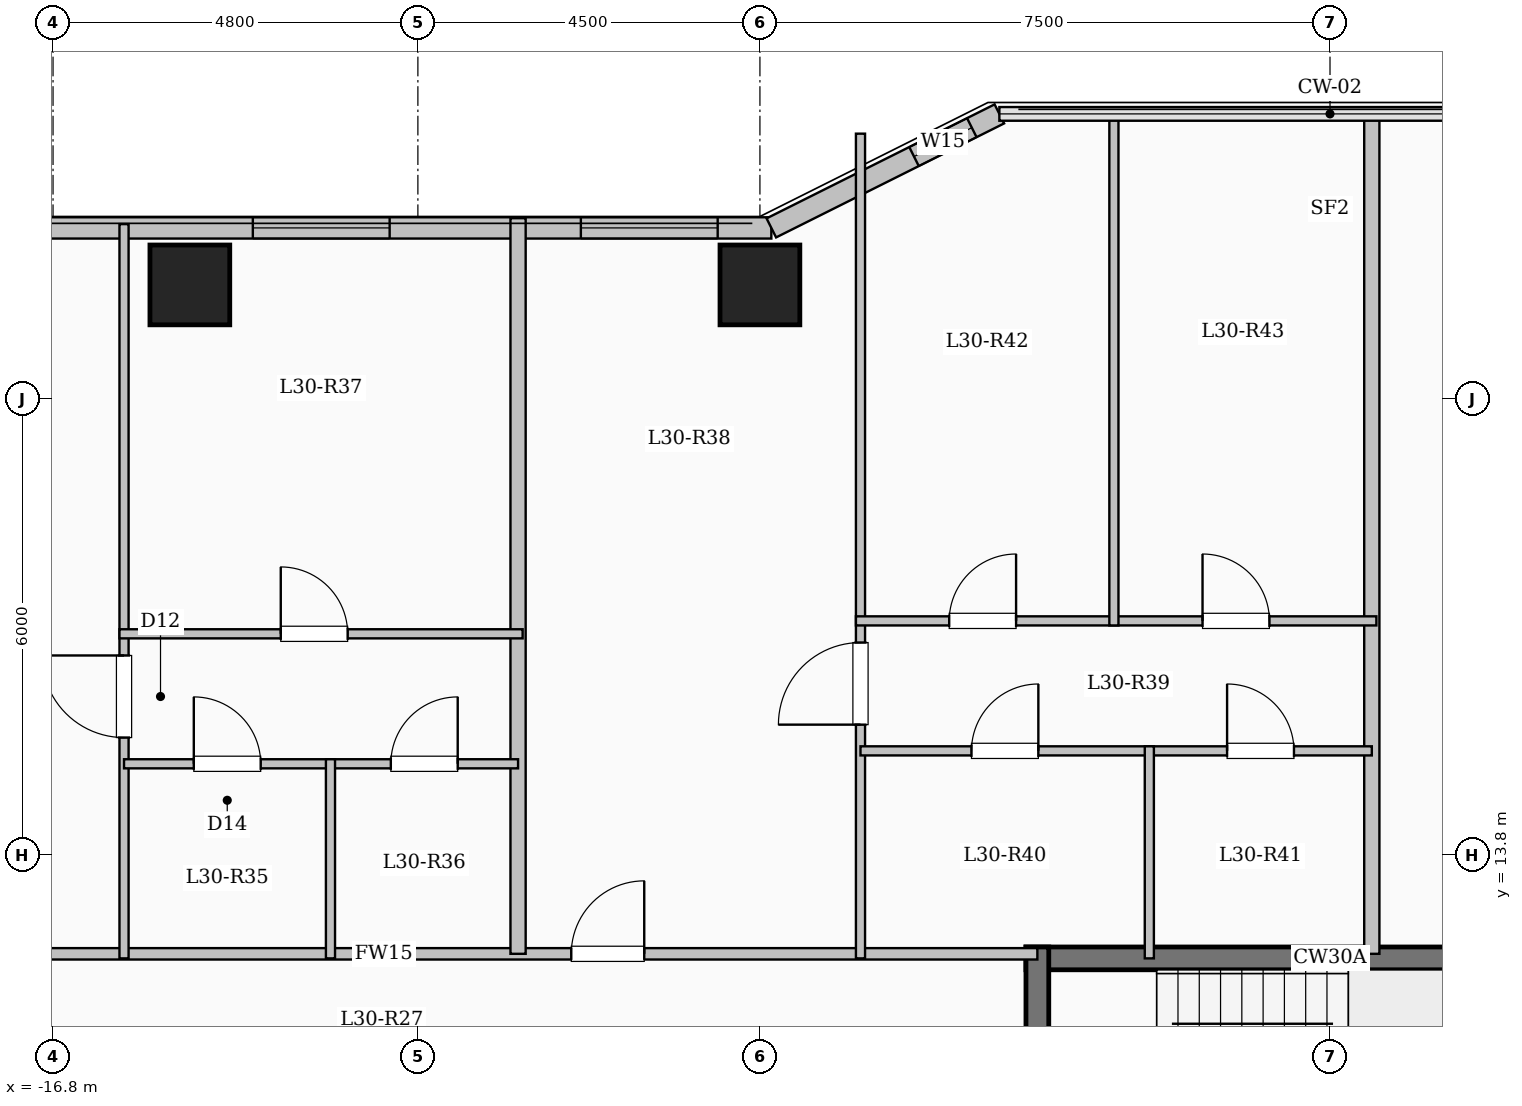
"""IFC4 building model, lengths in metres.
Left out: names, types, materials, properties, quantities, classifications, styles, units other than length and angle.
Written with IfcOpenShell. Run it as: python <this file> out.ifc"""

import sys

from ifc_helpers import new_model, si_unit, direction, frame, frame_2d, origin, origin_2d, place, context, subcontext, project, spatial, rectangle, extrude, element, fill, save


model = new_model("IFC4")
c1 = context("Model", 3, precision=1e-05, world=origin(), true_north=direction((0.0, 1.0)))
c2 = subcontext(c1, "Body", "Model", "MODEL_VIEW")
j1 = project(units=[si_unit("LENGTHUNIT", "METRE"), si_unit("PLANEANGLEUNIT", "RADIAN")], contexts=[c1])
p1 = place(None, origin())
s1 = spatial("IfcSite", under=j1, at=p1, CompositionType="ELEMENT")
p2 = place(p1, origin())
s2 = spatial("IfcBuilding", under=s1, at=p2, CompositionType="ELEMENT")
p3 = place(p2, frame((0.0, 0.0, 111.8)))
s3 = spatial("IfcBuildingStorey", under=s2, at=p3, CompositionType="ELEMENT", Elevation=111.8)
for number, where, z_axis, x_axis in (
    (1, (-15.0, 21.3, 0.0), (0.0, 0.0, 1.0), (1.0, 0.0, 0.0)),
    (2, (-7.5, 21.3, 0.0), (0.0, 0.0, 1.0), (1.0, 0.0, 0.0)),
):
    element("IfcColumn", number, at=place(p3, frame(where, z_axis=z_axis, x_axis=x_axis)), inside=s3, PredefinedType="COLUMN", context=c2, shape_type="SweptSolid", body=[
        extrude(rectangle(XDim=1.05, YDim=1.05, at=origin_2d()), origin(), (0.0, 0.0, 1.0), 3.35),
    ])
p4 = place(p3, frame((-21.15, 22.05, 0.0), z_axis=(0.0, 0.0, 1.0), x_axis=(1.0, 0.0, 0.0)))
e3 = element("IfcWall", 3, at=p4, inside=s3, PredefinedType="SOLIDWALL", context=c2, shape_type="SweptSolid", body=[
    extrude(rectangle(XDim=13.8, YDim=0.28, at=frame_2d((6.9, 0.0))), origin(), (0.0, 0.0, 1.0), 3.1),
])
p5 = place(p4, frame((1.485, 0.0, 0.9)))
e4 = element("IfcOpeningElement", 4, at=p5, cuts=e3, PredefinedType="OPENING", context=c2, shape_type="SweptSolid", body=[
    extrude(rectangle(XDim=2.4, YDim=1.8, at=frame_2d((1.2, 0.9))), frame((0.0, 0.15, 0.0), z_axis=(0.0, -1.0, 0.0), x_axis=(1.0, 0.0, 0.0)), (0.0, 0.0, 1.0), 0.3),
])
p6 = place(p4, frame((6.979, 0.0, 0.9)))
e5 = element("IfcOpeningElement", 5, at=p6, cuts=e3, PredefinedType="OPENING", context=c2, shape_type="SweptSolid", body=[
    extrude(rectangle(XDim=1.8, YDim=1.65, at=frame_2d((0.9, 0.825))), frame((0.0, 0.15, 0.0), z_axis=(0.0, -1.0, 0.0), x_axis=(1.0, 0.0, 0.0)), (0.0, 0.0, 1.0), 0.3),
])
p7 = place(p4, frame((11.294, 0.0, 0.9)))
e6 = element("IfcOpeningElement", 6, at=p7, cuts=e3, PredefinedType="OPENING", context=c2, shape_type="SweptSolid", body=[
    extrude(rectangle(XDim=1.8, YDim=1.65, at=frame_2d((0.9, 0.825))), frame((0.0, 0.15, 0.0), z_axis=(0.0, -1.0, 0.0), x_axis=(1.0, 0.0, 0.0)), (0.0, 0.0, 1.0), 0.3),
])
p8 = place(p3, frame((-7.35, 22.05, 0.0), z_axis=(0.0, 0.0, 1.0), x_axis=(0.894427191, 0.4472135955, 0.0)))
e7 = element("IfcWall", 7, at=p8, inside=s3, PredefinedType="SOLIDWALL", context=c2, shape_type="SweptSolid", body=[
    extrude(rectangle(XDim=3.354, YDim=0.28, at=frame_2d((1.677, 0.0))), origin(), (0.0, 0.0, 1.0), 3.1),
])
p9 = place(p8, frame((2.099, 0.0, 0.95)))
e8 = element("IfcOpeningElement", 8, at=p9, cuts=e7, PredefinedType="OPENING", context=c2, shape_type="SweptSolid", body=[
    extrude(rectangle(XDim=0.85, YDim=1.5, at=frame_2d((0.425, 0.75))), frame((0.0, 0.15, 0.0), z_axis=(0.0, -1.0, 0.0), x_axis=(1.0, 0.0, 0.0)), (0.0, 0.0, 1.0), 0.3),
])
p10 = place(p3, frame((-4.0, 12.44, 0.0), z_axis=(0.0, 0.0, 1.0), x_axis=(1.0, 0.0, 0.0)))
e9 = element("IfcWall", 9, at=p10, inside=s3, PredefinedType="SHEAR", context=c2, shape_type="SweptSolid", body=[
    extrude(rectangle(XDim=8.0, YDim=0.3, at=frame_2d((4.0, 0.0))), origin(), (0.0, 0.0, 1.0), 3.35),
])
p11 = place(p3, frame((-3.85, 9.0, 0.0), z_axis=(0.0, 0.0, 1.0), x_axis=(0.0, 1.0, 0.0)))
e10 = element("IfcWall", 10, at=p11, inside=s3, PredefinedType="SHEAR", context=c2, shape_type="SweptSolid", body=[
    extrude(rectangle(XDim=3.59, YDim=0.3, at=frame_2d((1.795, 0.0))), origin(), (0.0, 0.0, 1.0), 3.35),
])
p12 = place(p3, frame((-21.05, 12.5, 0.0), z_axis=(0.0, 0.0, 1.0), x_axis=(1.0, 0.0, 0.0)))
e11 = element("IfcWall", 11, at=p12, inside=s3, PredefinedType="PARTITIONING", context=c2, shape_type="SweptSolid", body=[
    extrude(rectangle(XDim=17.2, YDim=0.15, at=frame_2d((8.6, 0.0))), origin(), (0.0, 0.0, 1.0), 3.1),
])
p13 = place(p12, frame((0.7, 0.0, 0.0)))
e12 = element("IfcOpeningElement", 12, at=p13, cuts=e11, PredefinedType="OPENING", context=c2, shape_type="SweptSolid", body=[
    extrude(rectangle(XDim=0.96, YDim=2.15, at=frame_2d((0.48, 1.075))), frame((0.0, 0.085, 0.0), z_axis=(0.0, -1.0, 0.0), x_axis=(1.0, 0.0, 0.0)), (0.0, 0.0, 1.0), 0.17),
])
p14 = place(p12, frame((11.068, 0.0, 0.0)))
e13 = element("IfcOpeningElement", 13, at=p14, cuts=e11, PredefinedType="OPENING", context=c2, shape_type="SweptSolid", body=[
    extrude(rectangle(XDim=0.96, YDim=2.15, at=frame_2d((0.48, 1.075))), frame((0.0, 0.085, 0.0), z_axis=(0.0, -1.0, 0.0), x_axis=(1.0, 0.0, 0.0)), (0.0, 0.0, 1.0), 0.17),
])
p15 = place(p3, frame((0.55, 12.5, 0.0), z_axis=(0.0, 0.0, 1.0), x_axis=(0.0, 1.0, 0.0)))
e14 = element("IfcWall", 14, at=p15, inside=s3, PredefinedType="SOLIDWALL", context=c2, shape_type="SweptSolid", body=[
    extrude(rectangle(XDim=11.08, YDim=0.2, at=frame_2d((5.54, 0.0))), origin(), (0.0, 0.0, 1.0), 3.1),
])
p16 = place(p3, frame((-10.682, 12.5, 0.0), z_axis=(0.0, 0.0, 1.0), x_axis=(0.0, 1.0, 0.0)))
e15 = element("IfcWall", 15, at=p16, inside=s3, PredefinedType="SOLIDWALL", context=c2, shape_type="SweptSolid", body=[
    extrude(rectangle(XDim=9.678, YDim=0.2, at=frame_2d((4.839, 0.0))), origin(), (0.0, 0.0, 1.0), 3.1),
])
p17 = place(p3, frame((-15.866, 12.44, 0.0), z_axis=(0.0, 0.0, 1.0), x_axis=(0.0, 1.0, 0.0)))
e16 = element("IfcWall", 16, at=p17, inside=s3, PredefinedType="PARTITIONING", context=c2, shape_type="SweptSolid", body=[
    extrude(rectangle(XDim=9.66, YDim=0.12, at=frame_2d((4.83, 0.0))), origin(), (0.0, 0.0, 1.0), 3.1),
])
p18 = place(p17, frame((2.905, 0.0, 0.0)))
e17 = element("IfcOpeningElement", 17, at=p18, cuts=e16, PredefinedType="OPENING", context=c2, shape_type="SweptSolid", body=[
    extrude(rectangle(XDim=1.08, YDim=2.15, at=frame_2d((0.54, 1.075))), frame((0.0, 0.07, 0.0), z_axis=(0.0, -1.0, 0.0), x_axis=(1.0, 0.0, 0.0)), (0.0, 0.0, 1.0), 0.14),
])
p19 = place(p3, frame((-15.866, 15.0, 0.0), z_axis=(0.0, 0.0, 1.0), x_axis=(1.0, 0.0, 0.0)))
e18 = element("IfcWall", 18, at=p19, inside=s3, PredefinedType="PARTITIONING", context=c2, shape_type="SweptSolid", body=[
    extrude(rectangle(XDim=2.716, YDim=0.12, at=frame_2d((1.358, 0.0))), origin(), (0.0, 0.0, 1.0), 3.1),
])
p20 = place(p19, frame((0.918, 0.0, 0.0)))
e19 = element("IfcOpeningElement", 19, at=p20, cuts=e18, PredefinedType="OPENING", context=c2, shape_type="SweptSolid", body=[
    extrude(rectangle(XDim=0.88, YDim=2.1, at=frame_2d((0.44, 1.05))), frame((0.0, 0.07, 0.0), z_axis=(0.0, -1.0, 0.0), x_axis=(1.0, 0.0, 0.0)), (0.0, 0.0, 1.0), 0.14),
])
p21 = place(p3, frame((-13.15, 15.0, 0.0), z_axis=(0.0, 0.0, 1.0), x_axis=(1.0, 0.0, 0.0)))
e20 = element("IfcWall", 20, at=p21, inside=s3, PredefinedType="PARTITIONING", context=c2, shape_type="SweptSolid", body=[
    extrude(rectangle(XDim=2.468, YDim=0.12, at=frame_2d((1.234, 0.0))), origin(), (0.0, 0.0, 1.0), 3.1),
])
p22 = place(p21, frame((0.794, 0.0, 0.0)))
e21 = element("IfcOpeningElement", 21, at=p22, cuts=e20, PredefinedType="OPENING", context=c2, shape_type="SweptSolid", body=[
    extrude(rectangle(XDim=0.88, YDim=2.1, at=frame_2d((0.44, 1.05))), frame((0.0, 0.07, 0.0), z_axis=(0.0, -1.0, 0.0), x_axis=(1.0, 0.0, 0.0)), (0.0, 0.0, 1.0), 0.14),
])
p23 = place(p3, frame((-15.926, 16.71, 0.0), z_axis=(0.0, 0.0, 1.0), x_axis=(1.0, 0.0, 0.0)))
e22 = element("IfcWall", 22, at=p23, inside=s3, PredefinedType="PARTITIONING", context=c2, shape_type="SweptSolid", body=[
    extrude(rectangle(XDim=5.304, YDim=0.12, at=frame_2d((2.652, 0.0))), origin(), (0.0, 0.0, 1.0), 3.1),
])
p24 = place(p23, frame((2.122, 0.0, 0.0)))
e23 = element("IfcOpeningElement", 23, at=p24, cuts=e22, PredefinedType="OPENING", context=c2, shape_type="SweptSolid", body=[
    extrude(rectangle(XDim=0.88, YDim=2.1, at=frame_2d((0.44, 1.05))), frame((0.0, 0.07, 0.0), z_axis=(0.0, -1.0, 0.0), x_axis=(1.0, 0.0, 0.0)), (0.0, 0.0, 1.0), 0.14),
])
p25 = place(p3, frame((-13.15, 12.44, 0.0), z_axis=(0.0, 0.0, 1.0), x_axis=(0.0, 1.0, 0.0)))
e24 = element("IfcWall", 24, at=p25, inside=s3, PredefinedType="PARTITIONING", context=c2, shape_type="SweptSolid", body=[
    extrude(rectangle(XDim=2.62, YDim=0.12, at=frame_2d((1.31, 0.0))), origin(), (0.0, 0.0, 1.0), 3.1),
])
p26 = place(p3, frame((-6.177, 12.44, 0.0), z_axis=(0.0, 0.0, 1.0), x_axis=(0.0, 1.0, 0.0)))
e25 = element("IfcWall", 25, at=p26, inside=s3, PredefinedType="PARTITIONING", context=c2, shape_type="SweptSolid", body=[
    extrude(rectangle(XDim=10.85, YDim=0.12, at=frame_2d((5.425, 0.0))), origin(), (0.0, 0.0, 1.0), 3.1),
])
p27 = place(p26, frame((3.075, 0.0, 0.0)))
e26 = element("IfcOpeningElement", 26, at=p27, cuts=e25, PredefinedType="OPENING", context=c2, shape_type="SweptSolid", body=[
    extrude(rectangle(XDim=1.08, YDim=2.15, at=frame_2d((0.54, 1.075))), frame((0.0, 0.07, 0.0), z_axis=(0.0, -1.0, 0.0), x_axis=(1.0, 0.0, 0.0)), (0.0, 0.0, 1.0), 0.14),
])
p28 = place(p3, frame((-6.177, 15.17, 0.0), z_axis=(0.0, 0.0, 1.0), x_axis=(1.0, 0.0, 0.0)))
e27 = element("IfcWall", 27, at=p28, inside=s3, PredefinedType="PARTITIONING", context=c2, shape_type="SweptSolid", body=[
    extrude(rectangle(XDim=3.8, YDim=0.12, at=frame_2d((1.9, 0.0))), origin(), (0.0, 0.0, 1.0), 3.1),
])
p29 = place(p28, frame((1.46, 0.0, 0.0)))
e28 = element("IfcOpeningElement", 28, at=p29, cuts=e27, PredefinedType="OPENING", context=c2, shape_type="SweptSolid", body=[
    extrude(rectangle(XDim=0.88, YDim=2.1, at=frame_2d((0.44, 1.05))), frame((0.0, 0.07, 0.0), z_axis=(0.0, -1.0, 0.0), x_axis=(1.0, 0.0, 0.0)), (0.0, 0.0, 1.0), 0.14),
])
p30 = place(p3, frame((-2.377, 15.17, 0.0), z_axis=(0.0, 0.0, 1.0), x_axis=(1.0, 0.0, 0.0)))
e29 = element("IfcWall", 29, at=p30, inside=s3, PredefinedType="PARTITIONING", context=c2, shape_type="SweptSolid", body=[
    extrude(rectangle(XDim=2.927, YDim=0.12, at=frame_2d((1.463, 0.0))), origin(), (0.0, 0.0, 1.0), 3.1),
])
p31 = place(p30, frame((1.023, 0.0, 0.0)))
e30 = element("IfcOpeningElement", 30, at=p31, cuts=e29, PredefinedType="OPENING", context=c2, shape_type="SweptSolid", body=[
    extrude(rectangle(XDim=0.88, YDim=2.1, at=frame_2d((0.44, 1.05))), frame((0.0, 0.07, 0.0), z_axis=(0.0, -1.0, 0.0), x_axis=(1.0, 0.0, 0.0)), (0.0, 0.0, 1.0), 0.14),
])
p32 = place(p3, frame((-6.237, 16.88, 0.0), z_axis=(0.0, 0.0, 1.0), x_axis=(1.0, 0.0, 0.0)))
e31 = element("IfcWall", 31, at=p32, inside=s3, PredefinedType="PARTITIONING", context=c2, shape_type="SweptSolid", body=[
    extrude(rectangle(XDim=6.847, YDim=0.12, at=frame_2d((3.424, 0.0))), origin(), (0.0, 0.0, 1.0), 3.1),
])
p33 = place(p32, frame((1.227, 0.0, 0.0)))
e32 = element("IfcOpeningElement", 32, at=p33, cuts=e31, PredefinedType="OPENING", context=c2, shape_type="SweptSolid", body=[
    extrude(rectangle(XDim=0.88, YDim=2.1, at=frame_2d((0.44, 1.05))), frame((0.0, 0.07, 0.0), z_axis=(0.0, -1.0, 0.0), x_axis=(1.0, 0.0, 0.0)), (0.0, 0.0, 1.0), 0.14),
])
p34 = place(p32, frame((4.56, 0.0, 0.0)))
e33 = element("IfcOpeningElement", 33, at=p34, cuts=e31, PredefinedType="OPENING", context=c2, shape_type="SweptSolid", body=[
    extrude(rectangle(XDim=0.88, YDim=2.1, at=frame_2d((0.44, 1.05))), frame((0.0, 0.07, 0.0), z_axis=(0.0, -1.0, 0.0), x_axis=(1.0, 0.0, 0.0)), (0.0, 0.0, 1.0), 0.14),
])
p35 = place(p3, frame((-2.377, 12.44, 0.0), z_axis=(0.0, 0.0, 1.0), x_axis=(0.0, 1.0, 0.0)))
e34 = element("IfcWall", 34, at=p35, inside=s3, PredefinedType="PARTITIONING", context=c2, shape_type="SweptSolid", body=[
    extrude(rectangle(XDim=2.79, YDim=0.12, at=frame_2d((1.395, 0.0))), origin(), (0.0, 0.0, 1.0), 3.1),
])
p36 = place(p3, frame((-2.843, 16.82, 0.0), z_axis=(0.0, 0.0, 1.0), x_axis=(0.0, 1.0, 0.0)))
e35 = element("IfcWall", 35, at=p36, inside=s3, PredefinedType="PARTITIONING", context=c2, shape_type="SweptSolid", body=[
    extrude(rectangle(XDim=6.76, YDim=0.12, at=frame_2d((3.38, 0.0))), origin(), (0.0, 0.0, 1.0), 3.1),
])
p37 = place(p6, origin())
e36 = element("IfcWindow", 36, at=p37, inside=s3, PartitioningType="SINGLE_PANEL", PredefinedType="WINDOW", context=c2, shape_type="SweptSolid", body=[
    extrude(rectangle(XDim=1.8, YDim=1.65, at=frame_2d((0.9, 0.825))), frame((0.0, 0.03, 0.0), z_axis=(0.0, -1.0, 0.0), x_axis=(1.0, 0.0, 0.0)), (0.0, 0.0, 1.0), 0.06),
])
fill(e5, e36)
p38 = place(p7, origin())
e37 = element("IfcWindow", 37, at=p38, inside=s3, PartitioningType="SINGLE_PANEL", PredefinedType="WINDOW", context=c2, shape_type="SweptSolid", body=[
    extrude(rectangle(XDim=1.8, YDim=1.65, at=frame_2d((0.9, 0.825))), frame((0.0, 0.03, 0.0), z_axis=(0.0, -1.0, 0.0), x_axis=(1.0, 0.0, 0.0)), (0.0, 0.0, 1.0), 0.06),
])
fill(e6, e37)
p39 = place(p9, origin())
e38 = element("IfcWindow", 38, at=p39, inside=s3, PartitioningType="SINGLE_PANEL", PredefinedType="WINDOW", context=c2, shape_type="SweptSolid", body=[
    extrude(rectangle(XDim=0.85, YDim=1.5, at=frame_2d((0.425, 0.75))), frame((0.0, 0.03, 0.0), z_axis=(0.0, -1.0, 0.0), x_axis=(1.0, 0.0, 0.0)), (0.0, 0.0, 1.0), 0.06),
])
fill(e8, e38)
p40 = place(p18, origin())
e39 = element("IfcDoor", 39, at=p40, inside=s3, OperationType="SINGLE_SWING_RIGHT", PredefinedType="DOOR", context=c2, shape_type="SweptSolid", body=[
    extrude(rectangle(XDim=1.08, YDim=2.15, at=frame_2d((0.54, 1.075))), frame((0.0, 0.025, 0.0), z_axis=(0.0, -1.0, 0.0), x_axis=(1.0, 0.0, 0.0)), (0.0, 0.0, 1.0), 0.05),
])
fill(e17, e39)
p41 = place(p20, origin())
e40 = element("IfcDoor", 40, at=p41, inside=s3, OperationType="SINGLE_SWING_LEFT", PredefinedType="DOOR", context=c2, shape_type="SweptSolid", body=[
    extrude(rectangle(XDim=0.88, YDim=2.1, at=frame_2d((0.44, 1.05))), frame((0.0, 0.025, 0.0), z_axis=(0.0, -1.0, 0.0), x_axis=(1.0, 0.0, 0.0)), (0.0, 0.0, 1.0), 0.05),
])
fill(e19, e40)
p42 = place(p22, origin())
e41 = element("IfcDoor", 41, at=p42, inside=s3, OperationType="SINGLE_SWING_RIGHT", PredefinedType="DOOR", context=c2, shape_type="SweptSolid", body=[
    extrude(rectangle(XDim=0.88, YDim=2.1, at=frame_2d((0.44, 1.05))), frame((0.0, 0.025, 0.0), z_axis=(0.0, -1.0, 0.0), x_axis=(1.0, 0.0, 0.0)), (0.0, 0.0, 1.0), 0.05),
])
fill(e21, e41)
p43 = place(p24, origin())
e42 = element("IfcDoor", 42, at=p43, inside=s3, OperationType="SINGLE_SWING_LEFT", PredefinedType="DOOR", context=c2, shape_type="SweptSolid", body=[
    extrude(rectangle(XDim=0.88, YDim=2.1, at=frame_2d((0.44, 1.05))), frame((0.0, 0.025, 0.0), z_axis=(0.0, -1.0, 0.0), x_axis=(1.0, 0.0, 0.0)), (0.0, 0.0, 1.0), 0.05),
])
fill(e23, e42)
p44 = place(p14, origin())
e43 = element("IfcDoor", 43, at=p44, inside=s3, OperationType="SINGLE_SWING_RIGHT", PredefinedType="DOOR", context=c2, shape_type="SweptSolid", body=[
    extrude(rectangle(XDim=0.96, YDim=2.15, at=frame_2d((0.48, 1.075))), frame((0.0, 0.025, 0.0), z_axis=(0.0, -1.0, 0.0), x_axis=(1.0, 0.0, 0.0)), (0.0, 0.0, 1.0), 0.05),
])
fill(e13, e43)
p45 = place(p27, origin())
e44 = element("IfcDoor", 44, at=p45, inside=s3, OperationType="SINGLE_SWING_LEFT", PredefinedType="DOOR", context=c2, shape_type="SweptSolid", body=[
    extrude(rectangle(XDim=1.08, YDim=2.15, at=frame_2d((0.54, 1.075))), frame((0.0, 0.025, 0.0), z_axis=(0.0, -1.0, 0.0), x_axis=(1.0, 0.0, 0.0)), (0.0, 0.0, 1.0), 0.05),
])
fill(e26, e44)
p46 = place(p29, origin())
e45 = element("IfcDoor", 45, at=p46, inside=s3, OperationType="SINGLE_SWING_RIGHT", PredefinedType="DOOR", context=c2, shape_type="SweptSolid", body=[
    extrude(rectangle(XDim=0.88, YDim=2.1, at=frame_2d((0.44, 1.05))), frame((0.0, 0.025, 0.0), z_axis=(0.0, -1.0, 0.0), x_axis=(1.0, 0.0, 0.0)), (0.0, 0.0, 1.0), 0.05),
])
fill(e28, e45)
p47 = place(p31, origin())
e46 = element("IfcDoor", 46, at=p47, inside=s3, OperationType="SINGLE_SWING_LEFT", PredefinedType="DOOR", context=c2, shape_type="SweptSolid", body=[
    extrude(rectangle(XDim=0.88, YDim=2.1, at=frame_2d((0.44, 1.05))), frame((0.0, 0.025, 0.0), z_axis=(0.0, -1.0, 0.0), x_axis=(1.0, 0.0, 0.0)), (0.0, 0.0, 1.0), 0.05),
])
fill(e30, e46)
p48 = place(p33, origin())
e47 = element("IfcDoor", 47, at=p48, inside=s3, OperationType="SINGLE_SWING_RIGHT", PredefinedType="DOOR", context=c2, shape_type="SweptSolid", body=[
    extrude(rectangle(XDim=0.88, YDim=2.1, at=frame_2d((0.44, 1.05))), frame((0.0, 0.025, 0.0), z_axis=(0.0, -1.0, 0.0), x_axis=(1.0, 0.0, 0.0)), (0.0, 0.0, 1.0), 0.05),
])
fill(e32, e47)
p49 = place(p34, origin())
e48 = element("IfcDoor", 48, at=p49, inside=s3, OperationType="SINGLE_SWING_LEFT", PredefinedType="DOOR", context=c2, shape_type="SweptSolid", body=[
    extrude(rectangle(XDim=0.88, YDim=2.1, at=frame_2d((0.44, 1.05))), frame((0.0, 0.025, 0.0), z_axis=(0.0, -1.0, 0.0), x_axis=(1.0, 0.0, 0.0)), (0.0, 0.0, 1.0), 0.05),
])
fill(e33, e48)
save(model, sys.argv[1])
